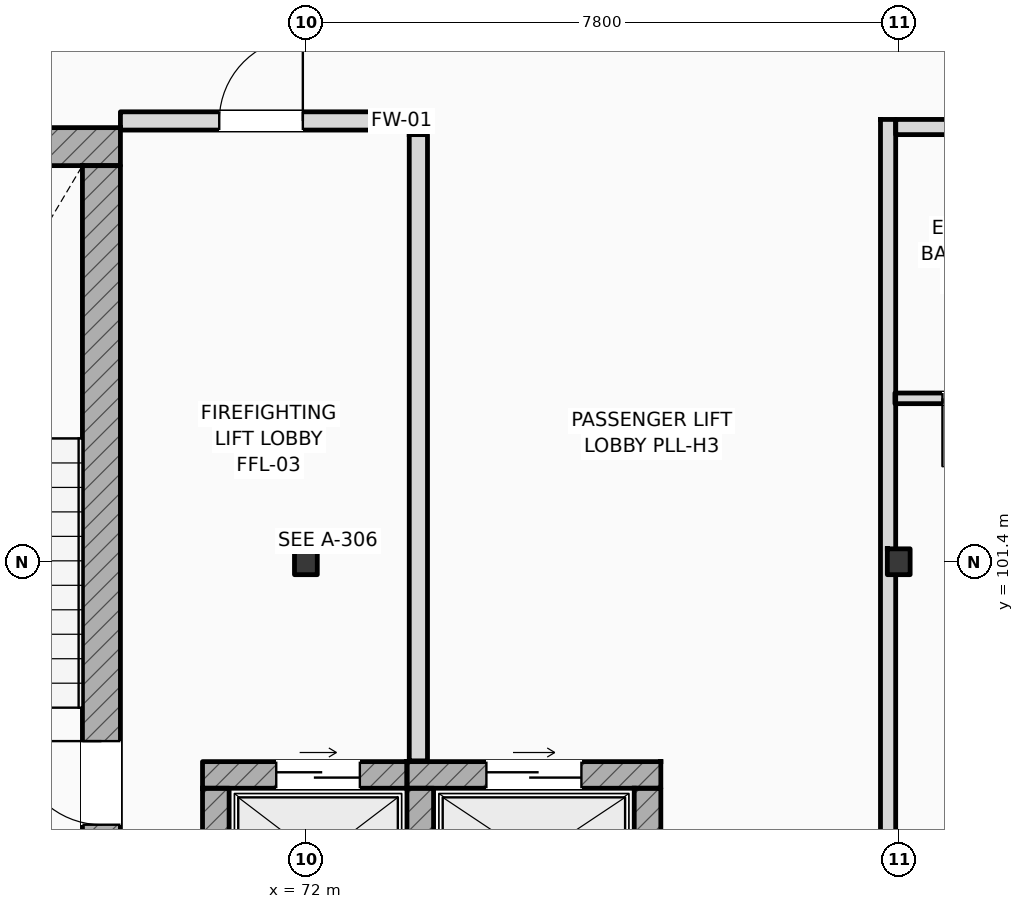
"""IFC4 building model, lengths in metres.
Left out: names, types, materials, properties, quantities, classifications, styles, units other than length and angle.
Written with IfcOpenShell. Run it as: python <this file> out.ifc"""

import sys

from ifc_helpers import new_model, si_unit, direction, frame, frame_2d, origin, origin_2d, place, context, subcontext, project, spatial, rectangle, i_section, extrude, element, fill, save


model = new_model("IFC4")
c1 = context("Model", 3, precision=1e-05, world=origin(), true_north=direction((0.0, 1.0)))
c2 = subcontext(c1, "Body", "Model", "MODEL_VIEW")
j1 = project(units=[si_unit("LENGTHUNIT", "METRE"), si_unit("PLANEANGLEUNIT", "RADIAN")], contexts=[c1])
p1 = place(None, origin())
s1 = spatial("IfcSite", under=j1, at=p1, CompositionType="ELEMENT")
p2 = place(p1, origin())
s2 = spatial("IfcBuilding", under=s1, at=p2, CompositionType="ELEMENT")
p3 = place(p2, frame((0.0, 0.0, 42.6)))
s3 = spatial("IfcBuildingStorey", under=s2, at=p3, CompositionType="ELEMENT", Elevation=42.6)
for number, where, z_axis, x_axis in (
    (1, (72.0, 101.4, 0.0), (0.0, 0.0, 1.0), (1.0, 0.0, 0.0)),
    (2, (79.8, 101.4, 0.0), (0.0, 0.0, 1.0), (1.0, 0.0, 0.0)),
):
    element("IfcColumn", number, at=place(p3, frame(where, z_axis=z_axis, x_axis=x_axis)), inside=s3, PredefinedType="COLUMN", context=c2, shape_type="SweptSolid", body=[
        extrude(i_section(OverallWidth=0.3, OverallDepth=0.34, WebThickness=0.012, FlangeThickness=0.021, FilletRadius=0.027, at=origin_2d()), origin(), (0.0, 0.0, 1.0), 4.2),
    ])
p4 = place(p3, frame((64.4, 106.862, 0.0), z_axis=(0.0, 0.0, 1.0), x_axis=(1.0, 0.0, 0.0)))
e3 = element("IfcWall", 3, at=p4, inside=s3, PredefinedType="SHEAR", context=c2, shape_type="SweptSolid", body=[
    extrude(rectangle(XDim=5.16, YDim=0.5, at=frame_2d((2.58, 0.0))), origin(), (0.0, 0.0, 1.0), 4.2),
])
p5 = place(p3, frame((69.31, 97.5, 0.0), z_axis=(0.0, 0.0, 1.0), x_axis=(0.0, 1.0, 0.0)))
e4 = element("IfcWall", 4, at=p5, inside=s3, PredefinedType="SHEAR", context=c2, shape_type="SweptSolid", body=[
    extrude(rectangle(XDim=9.112, YDim=0.5, at=frame_2d((4.556, 0.0))), origin(), (0.0, 0.0, 1.0), 4.2),
])
p6 = place(p5, frame((0.44, 0.0, 0.0)))
e5 = element("IfcOpeningElement", 5, at=p6, cuts=e4, PredefinedType="OPENING", context=c2, shape_type="SweptSolid", body=[
    extrude(rectangle(XDim=1.1, YDim=2.2, at=frame_2d((0.55, 1.1))), frame((0.0, 0.26, 0.0), z_axis=(0.0, -1.0, 0.0), x_axis=(1.0, 0.0, 0.0)), (0.0, 0.0, 1.0), 0.52),
])
p7 = place(p3, frame((70.64, 98.595, 0.0), z_axis=(0.0, 0.0, 1.0), x_axis=(1.0, 0.0, 0.0)))
e6 = element("IfcWall", 6, at=p7, inside=s3, PredefinedType="SHEAR", context=c2, shape_type="SweptSolid", body=[
    extrude(rectangle(XDim=2.69, YDim=0.35, at=frame_2d((1.345, 0.0))), origin(), (0.0, 0.0, 1.0), 3.94),
])
p8 = place(p7, frame((0.97, 0.0, 0.0)))
e7 = element("IfcOpeningElement", 7, at=p8, cuts=e6, PredefinedType="OPENING", context=c2, shape_type="SweptSolid", body=[
    extrude(rectangle(XDim=1.1, YDim=2.2, at=frame_2d((0.55, 1.1))), frame((0.0, 0.185, 0.0), z_axis=(0.0, -1.0, 0.0), x_axis=(1.0, 0.0, 0.0)), (0.0, 0.0, 1.0), 0.37),
])
p9 = place(p3, frame((70.815, 96.58, 0.0), z_axis=(0.0, 0.0, 1.0), x_axis=(0.0, 1.0, 0.0)))
e8 = element("IfcWall", 8, at=p9, inside=s3, PredefinedType="SHEAR", context=c2, shape_type="SweptSolid", body=[
    extrude(rectangle(XDim=1.84, YDim=0.35, at=frame_2d((0.92, 0.0))), origin(), (0.0, 0.0, 1.0), 3.94),
])
p10 = place(p3, frame((73.33, 98.595, 0.0), z_axis=(0.0, 0.0, 1.0), x_axis=(1.0, 0.0, 0.0)))
e9 = element("IfcWall", 9, at=p10, inside=s3, PredefinedType="SHEAR", context=c2, shape_type="SweptSolid", body=[
    extrude(rectangle(XDim=3.34, YDim=0.35, at=frame_2d((1.67, 0.0))), origin(), (0.0, 0.0, 1.0), 3.94),
])
p11 = place(p10, frame((1.045, 0.0, 0.0)))
e10 = element("IfcOpeningElement", 10, at=p11, cuts=e9, PredefinedType="OPENING", context=c2, shape_type="SweptSolid", body=[
    extrude(rectangle(XDim=1.25, YDim=2.25, at=frame_2d((0.625, 1.125))), frame((0.0, 0.185, 0.0), z_axis=(0.0, -1.0, 0.0), x_axis=(1.0, 0.0, 0.0)), (0.0, 0.0, 1.0), 0.37),
])
for number, where, z_axis, x_axis in (
    (11, (73.505, 96.58, 0.0), (0.0, 0.0, 1.0), (0.0, 1.0, 0.0)),
    (12, (76.495, 96.58, 0.0), (0.0, 0.0, 1.0), (0.0, 1.0, 0.0)),
):
    element("IfcWall", number, at=place(p3, frame(where, z_axis=z_axis, x_axis=x_axis)), inside=s3, PredefinedType="SHEAR", context=c2, shape_type="SweptSolid", body=[
        extrude(rectangle(XDim=1.84, YDim=0.35, at=frame_2d((0.92, 0.0))), origin(), (0.0, 0.0, 1.0), 3.94),
    ])
p12 = place(p3, frame((73.48, 98.78, 0.0), z_axis=(0.0, 0.0, 1.0), x_axis=(0.0, 1.0, 0.0)))
e13 = element("IfcWall", 13, at=p12, inside=s3, PredefinedType="STANDARD", context=c2, shape_type="SweptSolid", body=[
    extrude(rectangle(XDim=8.24, YDim=0.24, at=frame_2d((4.12, 0.0))), origin(), (0.0, 0.0, 1.0), 3.94),
])
p13 = place(p3, frame((69.56, 107.2, 0.0), z_axis=(0.0, 0.0, 1.0), x_axis=(1.0, 0.0, 0.0)))
e14 = element("IfcWall", 14, at=p13, inside=s3, PredefinedType="STANDARD", context=c2, shape_type="SweptSolid", body=[
    extrude(rectangle(XDim=4.1, YDim=0.24, at=frame_2d((2.05, 0.0))), origin(), (0.0, 0.0, 1.0), 3.94),
])
p14 = place(p13, frame((1.3, 0.0, 0.0)))
e15 = element("IfcOpeningElement", 15, at=p14, cuts=e14, PredefinedType="OPENING", context=c2, shape_type="SweptSolid", body=[
    extrude(rectangle(XDim=1.1, YDim=2.2, at=frame_2d((0.55, 1.1))), frame((0.0, 0.13, 0.0), z_axis=(0.0, -1.0, 0.0), x_axis=(1.0, 0.0, 0.0)), (0.0, 0.0, 1.0), 0.26),
])
p15 = place(p3, frame((79.76, 107.12, 0.0), z_axis=(0.0, 0.0, 1.0), x_axis=(1.0, 0.0, 0.0)))
e16 = element("IfcWall", 16, at=p15, inside=s3, PredefinedType="PARTITIONING", context=c2, shape_type="SweptSolid", body=[
    extrude(rectangle(XDim=15.5, YDim=0.2, at=frame_2d((7.75, 0.0))), origin(), (0.0, 0.0, 1.0), 3.94),
])
p16 = place(p15, frame((3.078, 0.0, 0.0)))
e17 = element("IfcOpeningElement", 17, at=p16, cuts=e16, PredefinedType="OPENING", context=c2, shape_type="SweptSolid", body=[
    extrude(rectangle(XDim=0.96, YDim=2.2, at=frame_2d((0.48, 1.1))), frame((0.0, 0.11, 0.0), z_axis=(0.0, -1.0, 0.0), x_axis=(1.0, 0.0, 0.0)), (0.0, 0.0, 1.0), 0.22),
])
p17 = place(p15, frame((8.186, 0.0, 0.0)))
e18 = element("IfcOpeningElement", 18, at=p17, cuts=e16, PredefinedType="OPENING", context=c2, shape_type="SweptSolid", body=[
    extrude(rectangle(XDim=0.96, YDim=2.2, at=frame_2d((0.48, 1.1))), frame((0.0, 0.11, 0.0), z_axis=(0.0, -1.0, 0.0), x_axis=(1.0, 0.0, 0.0)), (0.0, 0.0, 1.0), 0.22),
])
p18 = place(p15, frame((11.167, 0.0, 0.0)))
e19 = element("IfcOpeningElement", 19, at=p18, cuts=e16, PredefinedType="OPENING", context=c2, shape_type="SweptSolid", body=[
    extrude(rectangle(XDim=0.96, YDim=2.2, at=frame_2d((0.48, 1.1))), frame((0.0, 0.11, 0.0), z_axis=(0.0, -1.0, 0.0), x_axis=(1.0, 0.0, 0.0)), (0.0, 0.0, 1.0), 0.22),
])
p19 = place(p3, frame((79.66, 96.14, 0.0), z_axis=(0.0, 0.0, 1.0), x_axis=(0.0, 1.0, 0.0)))
e20 = element("IfcWall", 20, at=p19, inside=s3, PredefinedType="PARTITIONING", context=c2, shape_type="SweptSolid", body=[
    extrude(rectangle(XDim=11.08, YDim=0.2, at=frame_2d((5.54, 0.0))), origin(), (0.0, 0.0, 1.0), 3.51),
])
p20 = place(p3, frame((79.75, 103.55, 0.0), z_axis=(0.0, 0.0, 1.0), x_axis=(1.0, 0.0, 0.0)))
e21 = element("IfcWall", 21, at=p20, inside=s3, PredefinedType="PARTITIONING", context=c2, shape_type="SweptSolid", body=[
    extrude(rectangle(XDim=2.15, YDim=0.14, at=frame_2d((1.075, 0.0))), origin(), (0.0, 0.0, 1.0), 3.94),
])
p21 = place(p20, frame((0.625, 0.0, 0.0)))
e22 = element("IfcOpeningElement", 22, at=p21, cuts=e21, PredefinedType="OPENING", context=c2, shape_type="SweptSolid", body=[
    extrude(rectangle(XDim=0.9, YDim=2.1, at=frame_2d((0.45, 1.05))), frame((0.0, 0.08, 0.0), z_axis=(0.0, -1.0, 0.0), x_axis=(1.0, 0.0, 0.0)), (0.0, 0.0, 1.0), 0.16),
])
p22 = place(p6, origin())
e23 = element("IfcDoor", 23, at=p22, inside=s3, OperationType="SINGLE_SWING_RIGHT", PredefinedType="DOOR", context=c2, shape_type="SweptSolid", body=[
    extrude(rectangle(XDim=1.1, YDim=2.2, at=frame_2d((0.55, 1.1))), frame((0.0, 0.025, 0.0), z_axis=(0.0, -1.0, 0.0), x_axis=(1.0, 0.0, 0.0)), (0.0, 0.0, 1.0), 0.05),
])
fill(e5, e23)
p23 = place(p8, origin())
e24 = element("IfcDoor", 24, at=p23, inside=s3, OperationType="SLIDING_TO_LEFT", PredefinedType="DOOR", context=c2, shape_type="SweptSolid", body=[
    extrude(rectangle(XDim=1.1, YDim=2.2, at=frame_2d((0.55, 1.1))), frame((0.0, 0.025, 0.0), z_axis=(0.0, -1.0, 0.0), x_axis=(1.0, 0.0, 0.0)), (0.0, 0.0, 1.0), 0.05),
])
fill(e7, e24)
p24 = place(p11, origin())
e25 = element("IfcDoor", 25, at=p24, inside=s3, OperationType="SLIDING_TO_LEFT", PredefinedType="DOOR", context=c2, shape_type="SweptSolid", body=[
    extrude(rectangle(XDim=1.25, YDim=2.25, at=frame_2d((0.625, 1.125))), frame((0.0, 0.025, 0.0), z_axis=(0.0, -1.0, 0.0), x_axis=(1.0, 0.0, 0.0)), (0.0, 0.0, 1.0), 0.05),
])
fill(e10, e25)
p25 = place(p14, origin())
e26 = element("IfcDoor", 26, at=p25, inside=s3, OperationType="SINGLE_SWING_RIGHT", PredefinedType="DOOR", context=c2, shape_type="SweptSolid", body=[
    extrude(rectangle(XDim=1.1, YDim=2.2, at=frame_2d((0.55, 1.1))), frame((0.0, 0.025, 0.0), z_axis=(0.0, -1.0, 0.0), x_axis=(1.0, 0.0, 0.0)), (0.0, 0.0, 1.0), 0.05),
])
fill(e15, e26)
p26 = place(p21, frame((0.9, 0.0, 0.0), z_axis=(0.0, 0.0, 1.0), x_axis=(-1.0, 0.0, 0.0)))
e27 = element("IfcDoor", 27, at=p26, inside=s3, OperationType="SINGLE_SWING_LEFT", PredefinedType="DOOR", context=c2, shape_type="SweptSolid", body=[
    extrude(rectangle(XDim=0.9, YDim=2.1, at=frame_2d((0.45, 1.05))), frame((0.0, 0.025, 0.0), z_axis=(0.0, -1.0, 0.0), x_axis=(1.0, 0.0, 0.0)), (0.0, 0.0, 1.0), 0.05),
])
fill(e22, e27)
save(model, sys.argv[1])
